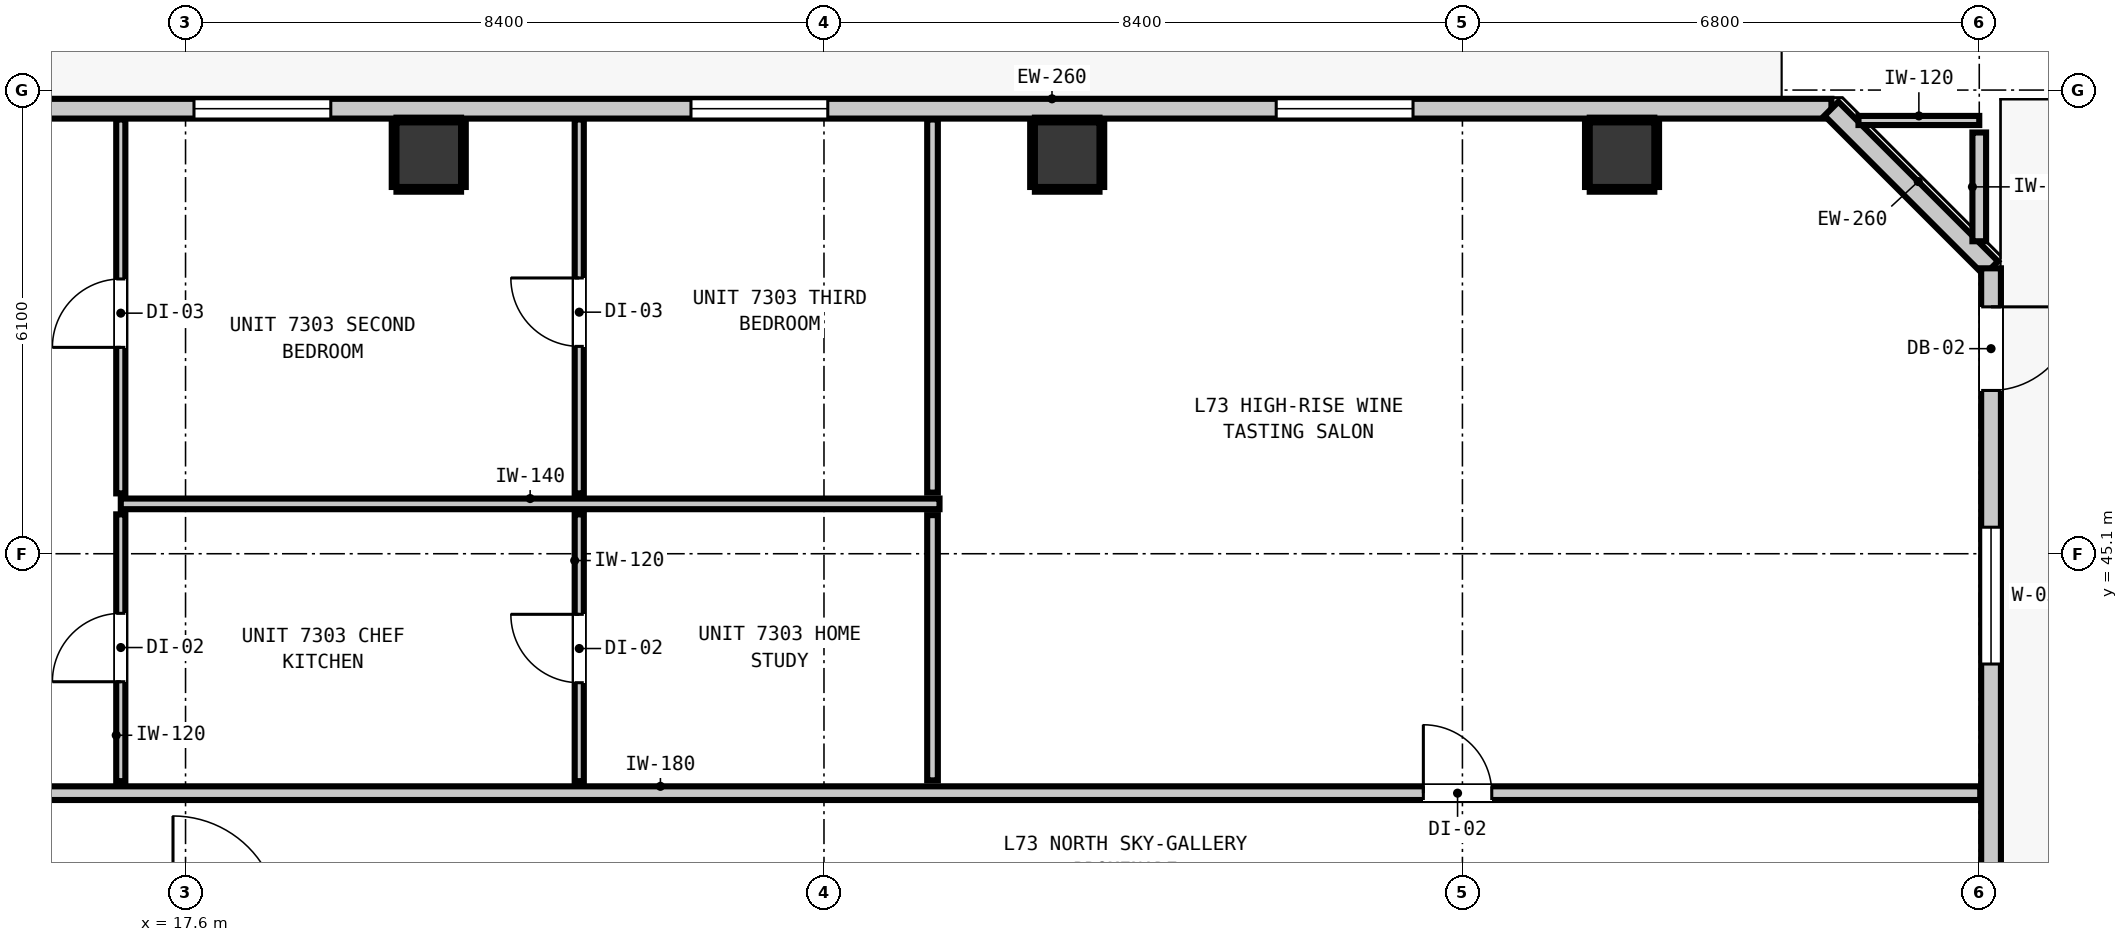
"""IFC4 building model, lengths in metres.
Left out: names, types, materials, properties, quantities, classifications, styles, units other than length and angle.
Written with IfcOpenShell. Run it as: python <this file> out.ifc"""

import sys

from ifc_helpers import new_model, si_unit, direction, frame, frame_2d, origin, origin_2d, place, context, subcontext, project, spatial, rectangle, extrude, element, fill, save


model = new_model("IFC4")
c1 = context("Model", 3, precision=1e-05, world=origin(), true_north=direction((0.0, 1.0)))
c2 = subcontext(c1, "Body", "Model", "MODEL_VIEW")
j1 = project(units=[si_unit("LENGTHUNIT", "METRE"), si_unit("PLANEANGLEUNIT", "RADIAN")], contexts=[c1])
p1 = place(None, origin())
s1 = spatial("IfcSite", under=j1, at=p1, CompositionType="ELEMENT")
p2 = place(p1, origin())
s2 = spatial("IfcBuilding", under=s1, at=p2, CompositionType="ELEMENT")
p3 = place(p2, frame((0.0, 0.0, 251.2)))
s3 = spatial("IfcBuildingStorey", under=s2, at=p3, CompositionType="ELEMENT", Elevation=251.2)
for number, where, z_axis, x_axis in (
    (1, (20.8, 50.35, -0.2), (0.0, 0.0, 1.0), (1.0, 0.0, 0.0)),
    (2, (29.2, 50.35, -0.2), (0.0, 0.0, 1.0), (1.0, 0.0, 0.0)),
    (3, (36.5, 50.35, -0.2), (0.0, 0.0, 1.0), (1.0, 0.0, 0.0)),
):
    element("IfcColumn", number, at=place(p3, frame(where, z_axis=z_axis, x_axis=x_axis)), inside=s3, PredefinedType="COLUMN", context=c2, shape_type="SweptSolid", body=[
        extrude(rectangle(XDim=0.85, YDim=0.85, at=origin_2d()), origin(), (0.0, 0.0, 1.0), 3.52),
    ])
p4 = place(p3, frame((6.545, 50.955, 0.0), z_axis=(0.0, 0.0, 1.0), x_axis=(1.0, 0.0, 0.0)))
e4 = element("IfcWall", 4, at=p4, inside=s3, PredefinedType="STANDARD", context=c2, shape_type="SweptSolid", body=[
    extrude(rectangle(XDim=32.71, YDim=0.26, at=frame_2d((16.355, 0.0))), origin(), (0.0, 0.0, 1.0), 3.1),
])
p5 = place(p4, frame((0.907, 0.0, 0.0)))
e5 = element("IfcOpeningElement", 5, at=p5, cuts=e4, PredefinedType="OPENING", context=c2, shape_type="SweptSolid", body=[
    extrude(rectangle(XDim=1.0, YDim=2.15, at=frame_2d((0.5, 1.075))), frame((0.0, 0.14, 0.0), z_axis=(0.0, -1.0, 0.0), x_axis=(1.0, 0.0, 0.0)), (0.0, 0.0, 1.0), 0.28),
])
p6 = place(p4, frame((4.028, 0.0, 0.85)))
e6 = element("IfcOpeningElement", 6, at=p6, cuts=e4, PredefinedType="OPENING", context=c2, shape_type="SweptSolid", body=[
    extrude(rectangle(XDim=1.8, YDim=1.9, at=frame_2d((0.9, 0.95))), frame((0.0, 0.14, 0.0), z_axis=(0.0, -1.0, 0.0), x_axis=(1.0, 0.0, 0.0)), (0.0, 0.0, 1.0), 0.28),
])
p7 = place(p4, frame((2.377, 0.0, 0.85)))
e7 = element("IfcOpeningElement", 7, at=p7, cuts=e4, PredefinedType="OPENING", context=c2, shape_type="SweptSolid", body=[
    extrude(rectangle(XDim=0.58, YDim=1.5, at=frame_2d((0.29, 0.75))), frame((0.0, 0.14, 0.0), z_axis=(0.0, -1.0, 0.0), x_axis=(1.0, 0.0, 0.0)), (0.0, 0.0, 1.0), 0.28),
])
p8 = place(p4, frame((11.166, 0.0, 0.85)))
e8 = element("IfcOpeningElement", 8, at=p8, cuts=e4, PredefinedType="OPENING", context=c2, shape_type="SweptSolid", body=[
    extrude(rectangle(XDim=1.8, YDim=1.9, at=frame_2d((0.9, 0.95))), frame((0.0, 0.14, 0.0), z_axis=(0.0, -1.0, 0.0), x_axis=(1.0, 0.0, 0.0)), (0.0, 0.0, 1.0), 0.28),
])
p9 = place(p4, frame((17.705, 0.0, 0.85)))
e9 = element("IfcOpeningElement", 9, at=p9, cuts=e4, PredefinedType="OPENING", context=c2, shape_type="SweptSolid", body=[
    extrude(rectangle(XDim=1.8, YDim=1.9, at=frame_2d((0.9, 0.95))), frame((0.0, 0.14, 0.0), z_axis=(0.0, -1.0, 0.0), x_axis=(1.0, 0.0, 0.0)), (0.0, 0.0, 1.0), 0.28),
])
p10 = place(p4, frame((25.405, 0.0, 0.85)))
e10 = element("IfcOpeningElement", 10, at=p10, cuts=e4, PredefinedType="OPENING", context=c2, shape_type="SweptSolid", body=[
    extrude(rectangle(XDim=1.8, YDim=1.9, at=frame_2d((0.9, 0.95))), frame((0.0, 0.14, 0.0), z_axis=(0.0, -1.0, 0.0), x_axis=(1.0, 0.0, 0.0)), (0.0, 0.0, 1.0), 0.28),
])
p11 = place(p3, frame((39.255, 50.955, 0.0), z_axis=(0.0, 0.0, 1.0), x_axis=(0.707106781187, -0.707106781187, 0.0)))
e11 = element("IfcWall", 11, at=p11, inside=s3, PredefinedType="STANDARD", context=c2, shape_type="SweptSolid", body=[
    extrude(rectangle(XDim=2.97, YDim=0.26, at=frame_2d((1.485, 0.0))), origin(), (0.0, 0.0, 1.0), 3.1),
])
p12 = place(p3, frame((41.355, 48.855, 0.0), z_axis=(0.0, 0.0, 1.0), x_axis=(0.0, -1.0, 0.0)))
e12 = element("IfcWall", 12, at=p12, inside=s3, PredefinedType="STANDARD", context=c2, shape_type="SweptSolid", body=[
    extrude(rectangle(XDim=30.31, YDim=0.26, at=frame_2d((15.155, 0.0))), origin(), (0.0, 0.0, 1.0), 3.1),
])
p13 = place(p12, frame((0.507, 0.0, 0.0)))
e13 = element("IfcOpeningElement", 13, at=p13, cuts=e12, PredefinedType="OPENING", context=c2, shape_type="SweptSolid", body=[
    extrude(rectangle(XDim=1.1, YDim=2.15, at=frame_2d((0.55, 1.075))), frame((0.0, 0.14, 0.0), z_axis=(0.0, -1.0, 0.0), x_axis=(1.0, 0.0, 0.0)), (0.0, 0.0, 1.0), 0.28),
])
p14 = place(p12, frame((3.406, 0.0, 0.85)))
e14 = element("IfcOpeningElement", 14, at=p14, cuts=e12, PredefinedType="OPENING", context=c2, shape_type="SweptSolid", body=[
    extrude(rectangle(XDim=1.8, YDim=1.9, at=frame_2d((0.9, 0.95))), frame((0.0, 0.14, 0.0), z_axis=(0.0, -1.0, 0.0), x_axis=(1.0, 0.0, 0.0)), (0.0, 0.0, 1.0), 0.28),
])
p15 = place(p3, frame((4.587, 41.95, 0.0), z_axis=(0.0, 0.0, 1.0), x_axis=(1.0, 0.0, 0.0)))
e15 = element("IfcWall", 15, at=p15, inside=s3, PredefinedType="PARTITIONING", context=c2, shape_type="SweptSolid", body=[
    extrude(rectangle(XDim=36.626, YDim=0.18, at=frame_2d((18.313, 0.0))), origin(), (0.0, 0.0, 1.0), 3.1),
])
p16 = place(p15, frame((8.223, 0.0, 0.0)))
e16 = element("IfcOpeningElement", 16, at=p16, cuts=e15, PredefinedType="OPENING", context=c2, shape_type="SweptSolid", body=[
    extrude(rectangle(XDim=1.0, YDim=2.15, at=frame_2d((0.5, 1.075))), frame((0.0, 0.1, 0.0), z_axis=(0.0, -1.0, 0.0), x_axis=(1.0, 0.0, 0.0)), (0.0, 0.0, 1.0), 0.2),
])
p17 = place(p15, frame((29.299, 0.0, 0.0)))
e17 = element("IfcOpeningElement", 17, at=p17, cuts=e15, PredefinedType="OPENING", context=c2, shape_type="SweptSolid", body=[
    extrude(rectangle(XDim=0.9, YDim=2.1, at=frame_2d((0.45, 1.05))), frame((0.0, 0.1, 0.0), z_axis=(0.0, -1.0, 0.0), x_axis=(1.0, 0.0, 0.0)), (0.0, 0.0, 1.0), 0.2),
])
p18 = place(p3, frame((16.748, 45.756, 0.0), z_axis=(0.0, 0.0, 1.0), x_axis=(1.0, 0.0, 0.0)))
e18 = element("IfcWall", 18, at=p18, inside=s3, PredefinedType="PARTITIONING", context=c2, shape_type="SweptSolid", body=[
    extrude(rectangle(XDim=10.772, YDim=0.14, at=frame_2d((5.386, 0.0))), origin(), (0.0, 0.0, 1.0), 3.1),
])
p19 = place(p3, frame((39.611, 50.8, 0.0), z_axis=(0.0, 0.0, 1.0), x_axis=(1.0, 0.0, 0.0)))
e19 = element("IfcWall", 19, at=p19, inside=s3, PredefinedType="PARTITIONING", context=c2, shape_type="SweptSolid", body=[
    extrude(rectangle(XDim=1.589, YDim=0.12, at=frame_2d((0.794, 0.0))), origin(), (0.0, 0.0, 1.0), 3.1),
])
p20 = place(p3, frame((41.2, 49.211, 0.0), z_axis=(0.0, 0.0, 1.0), x_axis=(0.0, 1.0, 0.0)))
e20 = element("IfcWall", 20, at=p20, inside=s3, PredefinedType="PARTITIONING", context=c2, shape_type="SweptSolid", body=[
    extrude(rectangle(XDim=1.431, YDim=0.18, at=frame_2d((0.716, 0.0))), origin(), (0.0, 0.0, 1.0), 3.1),
])
p21 = place(p3, frame((27.428, 42.118, 0.0), z_axis=(0.0, 0.0, 1.0), x_axis=(0.0, 1.0, 0.0)))
e21 = element("IfcWall", 21, at=p21, inside=s3, PredefinedType="PARTITIONING", context=c2, shape_type="SweptSolid", body=[
    extrude(rectangle(XDim=3.49, YDim=0.14, at=frame_2d((1.745, 0.0))), origin(), (0.0, 0.0, 1.0), 3.1),
])
p22 = place(p3, frame((27.428, 45.904, 0.0), z_axis=(0.0, 0.0, 1.0), x_axis=(0.0, 1.0, 0.0)))
e22 = element("IfcWall", 22, at=p22, inside=s3, PredefinedType="PARTITIONING", context=c2, shape_type="SweptSolid", body=[
    extrude(rectangle(XDim=4.909, YDim=0.14, at=frame_2d((2.455, 0.0))), origin(), (0.0, 0.0, 1.0), 3.1),
])
p23 = place(p3, frame((16.748, 42.108, 0.0), z_axis=(0.0, 0.0, 1.0), x_axis=(0.0, 1.0, 0.0)))
e23 = element("IfcWall", 23, at=p23, inside=s3, PredefinedType="PARTITIONING", context=c2, shape_type="SweptSolid", body=[
    extrude(rectangle(XDim=3.51, YDim=0.12, at=frame_2d((1.755, 0.0))), origin(), (0.0, 0.0, 1.0), 3.1),
])
p24 = place(p23, frame((1.308, 0.0, 0.0)))
e24 = element("IfcOpeningElement", 24, at=p24, cuts=e23, PredefinedType="OPENING", context=c2, shape_type="SweptSolid", body=[
    extrude(rectangle(XDim=0.9, YDim=2.1, at=frame_2d((0.45, 1.05))), frame((0.0, 0.07, 0.0), z_axis=(0.0, -1.0, 0.0), x_axis=(1.0, 0.0, 0.0)), (0.0, 0.0, 1.0), 0.14),
])
p25 = place(p3, frame((16.748, 45.894, 0.0), z_axis=(0.0, 0.0, 1.0), x_axis=(0.0, 1.0, 0.0)))
e25 = element("IfcWall", 25, at=p25, inside=s3, PredefinedType="PARTITIONING", context=c2, shape_type="SweptSolid", body=[
    extrude(rectangle(XDim=4.919, YDim=0.12, at=frame_2d((2.459, 0.0))), origin(), (0.0, 0.0, 1.0), 3.1),
])
p26 = place(p25, frame((1.921, 0.0, 0.0)))
e26 = element("IfcOpeningElement", 26, at=p26, cuts=e25, PredefinedType="OPENING", context=c2, shape_type="SweptSolid", body=[
    extrude(rectangle(XDim=0.9, YDim=2.1, at=frame_2d((0.45, 1.05))), frame((0.0, 0.07, 0.0), z_axis=(0.0, -1.0, 0.0), x_axis=(1.0, 0.0, 0.0)), (0.0, 0.0, 1.0), 0.14),
])
p27 = place(p3, frame((22.78, 42.108, 0.0), z_axis=(0.0, 0.0, 1.0), x_axis=(0.0, 1.0, 0.0)))
e27 = element("IfcWall", 27, at=p27, inside=s3, PredefinedType="PARTITIONING", context=c2, shape_type="SweptSolid", body=[
    extrude(rectangle(XDim=3.51, YDim=0.12, at=frame_2d((1.755, 0.0))), origin(), (0.0, 0.0, 1.0), 3.1),
])
p28 = place(p27, frame((1.295, 0.0, 0.0)))
e28 = element("IfcOpeningElement", 28, at=p28, cuts=e27, PredefinedType="OPENING", context=c2, shape_type="SweptSolid", body=[
    extrude(rectangle(XDim=0.9, YDim=2.1, at=frame_2d((0.45, 1.05))), frame((0.0, 0.07, 0.0), z_axis=(0.0, -1.0, 0.0), x_axis=(1.0, 0.0, 0.0)), (0.0, 0.0, 1.0), 0.14),
])
p29 = place(p3, frame((22.78, 45.894, 0.0), z_axis=(0.0, 0.0, 1.0), x_axis=(0.0, 1.0, 0.0)))
e29 = element("IfcWall", 29, at=p29, inside=s3, PredefinedType="PARTITIONING", context=c2, shape_type="SweptSolid", body=[
    extrude(rectangle(XDim=4.919, YDim=0.12, at=frame_2d((2.459, 0.0))), origin(), (0.0, 0.0, 1.0), 3.1),
])
p30 = place(p29, frame((1.934, 0.0, 0.0)))
e30 = element("IfcOpeningElement", 30, at=p30, cuts=e29, PredefinedType="OPENING", context=c2, shape_type="SweptSolid", body=[
    extrude(rectangle(XDim=0.9, YDim=2.1, at=frame_2d((0.45, 1.05))), frame((0.0, 0.07, 0.0), z_axis=(0.0, -1.0, 0.0), x_axis=(1.0, 0.0, 0.0)), (0.0, 0.0, 1.0), 0.14),
])
for number, where, z_axis, x_axis in (
    (31, (20.375, 49.893, 0.0), (0.0, 0.0, 1.0), (1.0, 0.0, 0.0)),
    (32, (20.375, 50.807, 0.0), (0.0, 0.0, 1.0), (1.0, 0.0, 0.0)),
):
    element("IfcWall", number, at=place(p3, frame(where, z_axis=z_axis, x_axis=x_axis)), inside=s3, PredefinedType="PARTITIONING", context=c2, shape_type="SweptSolid", body=[
        extrude(rectangle(XDim=0.85, YDim=0.06, at=frame_2d((0.425, 0.0))), origin(), (0.0, 0.0, 1.0), 1.45),
    ])
for number, where, z_axis, x_axis in (
    (33, (20.343, 49.925, 0.0), (0.0, 0.0, 1.0), (0.0, 1.0, 0.0)),
    (34, (21.257, 49.925, 0.0), (0.0, 0.0, 1.0), (0.0, 1.0, 0.0)),
):
    element("IfcWall", number, at=place(p3, frame(where, z_axis=z_axis, x_axis=x_axis)), inside=s3, PredefinedType="PARTITIONING", context=c2, shape_type="SweptSolid", body=[
        extrude(rectangle(XDim=0.85, YDim=0.06, at=frame_2d((0.425, 0.0))), origin(), (0.0, 0.0, 1.0), 1.45),
    ])
for number, where, z_axis, x_axis in (
    (35, (28.775, 49.893, 0.0), (0.0, 0.0, 1.0), (1.0, 0.0, 0.0)),
    (36, (28.775, 50.807, 0.0), (0.0, 0.0, 1.0), (1.0, 0.0, 0.0)),
):
    element("IfcWall", number, at=place(p3, frame(where, z_axis=z_axis, x_axis=x_axis)), inside=s3, PredefinedType="PARTITIONING", context=c2, shape_type="SweptSolid", body=[
        extrude(rectangle(XDim=0.85, YDim=0.06, at=frame_2d((0.425, 0.0))), origin(), (0.0, 0.0, 1.0), 1.45),
    ])
for number, where, z_axis, x_axis in (
    (37, (28.743, 49.925, 0.0), (0.0, 0.0, 1.0), (0.0, 1.0, 0.0)),
    (38, (29.657, 49.925, 0.0), (0.0, 0.0, 1.0), (0.0, 1.0, 0.0)),
):
    element("IfcWall", number, at=place(p3, frame(where, z_axis=z_axis, x_axis=x_axis)), inside=s3, PredefinedType="PARTITIONING", context=c2, shape_type="SweptSolid", body=[
        extrude(rectangle(XDim=0.85, YDim=0.06, at=frame_2d((0.425, 0.0))), origin(), (0.0, 0.0, 1.0), 1.45),
    ])
for number, where, z_axis, x_axis in (
    (39, (36.075, 49.893, 0.0), (0.0, 0.0, 1.0), (1.0, 0.0, 0.0)),
    (40, (36.075, 50.807, 0.0), (0.0, 0.0, 1.0), (1.0, 0.0, 0.0)),
):
    element("IfcWall", number, at=place(p3, frame(where, z_axis=z_axis, x_axis=x_axis)), inside=s3, PredefinedType="PARTITIONING", context=c2, shape_type="SweptSolid", body=[
        extrude(rectangle(XDim=0.85, YDim=0.06, at=frame_2d((0.425, 0.0))), origin(), (0.0, 0.0, 1.0), 1.45),
    ])
for number, where, z_axis, x_axis in (
    (41, (36.043, 49.925, 0.0), (0.0, 0.0, 1.0), (0.0, 1.0, 0.0)),
    (42, (36.957, 49.925, 0.0), (0.0, 0.0, 1.0), (0.0, 1.0, 0.0)),
):
    element("IfcWall", number, at=place(p3, frame(where, z_axis=z_axis, x_axis=x_axis)), inside=s3, PredefinedType="PARTITIONING", context=c2, shape_type="SweptSolid", body=[
        extrude(rectangle(XDim=0.85, YDim=0.06, at=frame_2d((0.425, 0.0))), origin(), (0.0, 0.0, 1.0), 1.45),
    ])
p31 = place(p13, origin())
e43 = element("IfcDoor", 43, at=p31, inside=s3, OperationType="SINGLE_SWING_LEFT", PredefinedType="DOOR", context=c2, shape_type="SweptSolid", body=[
    extrude(rectangle(XDim=1.1, YDim=2.15, at=frame_2d((0.55, 1.075))), frame((0.0, 0.025, 0.0), z_axis=(0.0, -1.0, 0.0), x_axis=(1.0, 0.0, 0.0)), (0.0, 0.0, 1.0), 0.05),
])
fill(e13, e43)
p32 = place(p8, origin())
e44 = element("IfcWindow", 44, at=p32, inside=s3, PartitioningType="SINGLE_PANEL", PredefinedType="WINDOW", context=c2, shape_type="SweptSolid", body=[
    extrude(rectangle(XDim=1.8, YDim=1.9, at=frame_2d((0.9, 0.95))), frame((0.0, 0.03, 0.0), z_axis=(0.0, -1.0, 0.0), x_axis=(1.0, 0.0, 0.0)), (0.0, 0.0, 1.0), 0.06),
])
fill(e8, e44)
p33 = place(p9, origin())
e45 = element("IfcWindow", 45, at=p33, inside=s3, PartitioningType="SINGLE_PANEL", PredefinedType="WINDOW", context=c2, shape_type="SweptSolid", body=[
    extrude(rectangle(XDim=1.8, YDim=1.9, at=frame_2d((0.9, 0.95))), frame((0.0, 0.03, 0.0), z_axis=(0.0, -1.0, 0.0), x_axis=(1.0, 0.0, 0.0)), (0.0, 0.0, 1.0), 0.06),
])
fill(e9, e45)
p34 = place(p10, origin())
e46 = element("IfcWindow", 46, at=p34, inside=s3, PartitioningType="SINGLE_PANEL", PredefinedType="WINDOW", context=c2, shape_type="SweptSolid", body=[
    extrude(rectangle(XDim=1.8, YDim=1.9, at=frame_2d((0.9, 0.95))), frame((0.0, 0.03, 0.0), z_axis=(0.0, -1.0, 0.0), x_axis=(1.0, 0.0, 0.0)), (0.0, 0.0, 1.0), 0.06),
])
fill(e10, e46)
p35 = place(p14, origin())
e47 = element("IfcWindow", 47, at=p35, inside=s3, PartitioningType="SINGLE_PANEL", PredefinedType="WINDOW", context=c2, shape_type="SweptSolid", body=[
    extrude(rectangle(XDim=1.8, YDim=1.9, at=frame_2d((0.9, 0.95))), frame((0.0, 0.03, 0.0), z_axis=(0.0, -1.0, 0.0), x_axis=(1.0, 0.0, 0.0)), (0.0, 0.0, 1.0), 0.06),
])
fill(e14, e47)
p36 = place(p24, origin())
e48 = element("IfcDoor", 48, at=p36, inside=s3, OperationType="SINGLE_SWING_LEFT", PredefinedType="DOOR", context=c2, shape_type="SweptSolid", body=[
    extrude(rectangle(XDim=0.9, YDim=2.1, at=frame_2d((0.45, 1.05))), frame((0.0, 0.025, 0.0), z_axis=(0.0, -1.0, 0.0), x_axis=(1.0, 0.0, 0.0)), (0.0, 0.0, 1.0), 0.05),
])
fill(e24, e48)
p37 = place(p28, origin())
e49 = element("IfcDoor", 49, at=p37, inside=s3, OperationType="SINGLE_SWING_RIGHT", PredefinedType="DOOR", context=c2, shape_type="SweptSolid", body=[
    extrude(rectangle(XDim=0.9, YDim=2.1, at=frame_2d((0.45, 1.05))), frame((0.0, 0.025, 0.0), z_axis=(0.0, -1.0, 0.0), x_axis=(1.0, 0.0, 0.0)), (0.0, 0.0, 1.0), 0.05),
])
fill(e28, e49)
p38 = place(p26, origin())
e50 = element("IfcDoor", 50, at=p38, inside=s3, OperationType="SINGLE_SWING_LEFT", PredefinedType="DOOR", context=c2, shape_type="SweptSolid", body=[
    extrude(rectangle(XDim=0.9, YDim=2.1, at=frame_2d((0.45, 1.05))), frame((0.0, 0.025, 0.0), z_axis=(0.0, -1.0, 0.0), x_axis=(1.0, 0.0, 0.0)), (0.0, 0.0, 1.0), 0.05),
])
fill(e26, e50)
p39 = place(p30, origin())
e51 = element("IfcDoor", 51, at=p39, inside=s3, OperationType="SINGLE_SWING_RIGHT", PredefinedType="DOOR", context=c2, shape_type="SweptSolid", body=[
    extrude(rectangle(XDim=0.9, YDim=2.1, at=frame_2d((0.45, 1.05))), frame((0.0, 0.025, 0.0), z_axis=(0.0, -1.0, 0.0), x_axis=(1.0, 0.0, 0.0)), (0.0, 0.0, 1.0), 0.05),
])
fill(e30, e51)
p40 = place(p17, origin())
e52 = element("IfcDoor", 52, at=p40, inside=s3, OperationType="SINGLE_SWING_LEFT", PredefinedType="DOOR", context=c2, shape_type="SweptSolid", body=[
    extrude(rectangle(XDim=0.9, YDim=2.1, at=frame_2d((0.45, 1.05))), frame((0.0, 0.025, 0.0), z_axis=(0.0, -1.0, 0.0), x_axis=(1.0, 0.0, 0.0)), (0.0, 0.0, 1.0), 0.05),
])
fill(e17, e52)
save(model, sys.argv[1])
